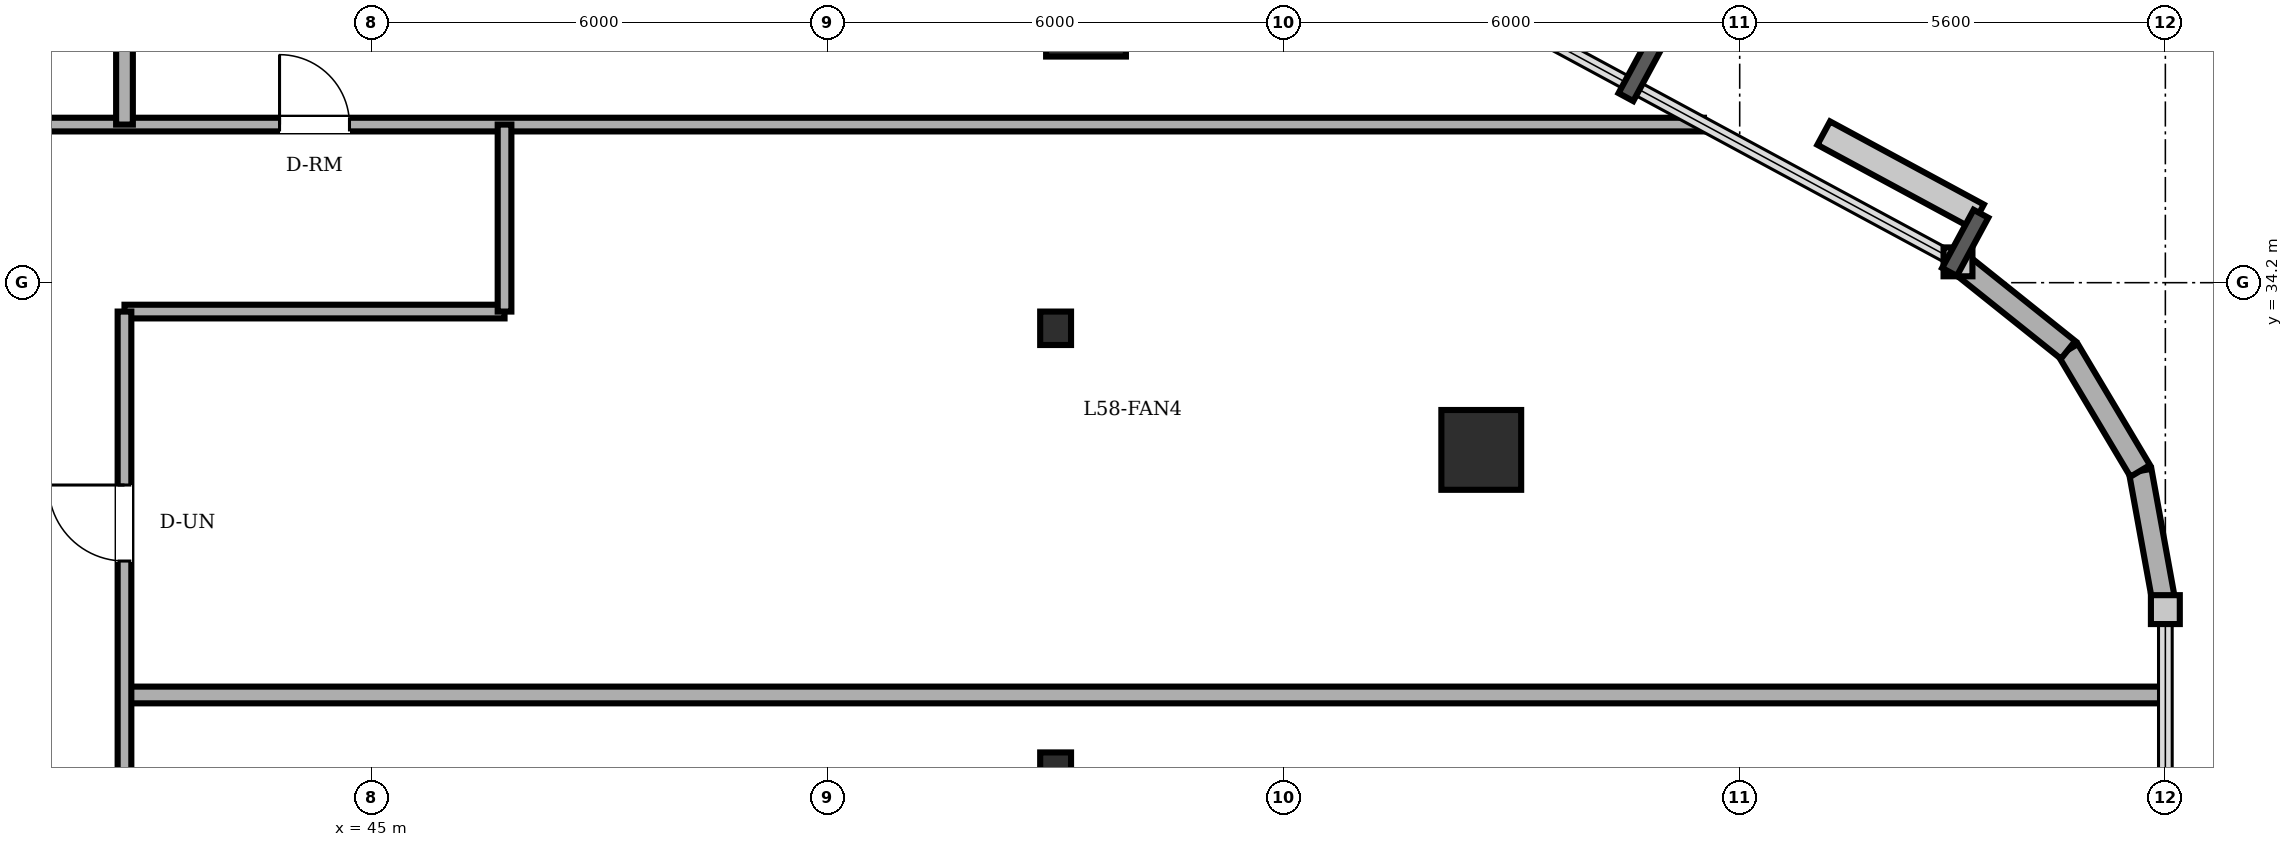
"""IFC4 building model, lengths in metres.
Left out: names, types, materials, properties, quantities, classifications, styles, units other than length and angle.
Written with IfcOpenShell. Run it as: python <this file> out.ifc"""

import sys

from ifc_helpers import new_model, si_unit, direction, frame, frame_2d, origin, origin_2d, place, context, subcontext, project, spatial, rectangle, circle, i_section, extrude, element, fill, save


model = new_model("IFC4")
c1 = context("Model", 3, precision=1e-05, world=origin(), true_north=direction((0.0, 1.0)))
c2 = subcontext(c1, "Body", "Model", "MODEL_VIEW")
j1 = project(units=[si_unit("LENGTHUNIT", "METRE"), si_unit("PLANEANGLEUNIT", "RADIAN")], contexts=[c1])
p1 = place(None, origin())
s1 = spatial("IfcSite", under=j1, at=p1, CompositionType="ELEMENT")
p2 = place(p1, origin())
s2 = spatial("IfcBuilding", under=s1, at=p2, CompositionType="ELEMENT")
p3 = place(p2, frame((0.0, 0.0, 222.9)))
s3 = spatial("IfcBuildingStorey", under=s2, at=p3, CompositionType="ELEMENT", Elevation=222.9)
for number, where, z_axis, x_axis in (
    (1, (59.6, 32.0, 0.0), (0.0, 0.0, 1.0), (1.0, 0.0, 0.0)),
    (2, (54.4, 37.7, 0.0), (0.0, 0.0, 1.0), (1.0, 0.0, 0.0)),
):
    element("IfcColumn", number, at=place(p3, frame(where, z_axis=z_axis, x_axis=x_axis)), inside=s3, PredefinedType="COLUMN", context=c2, shape_type="SweptSolid", body=[
        extrude(circle(Radius=0.525, at=origin_2d()), origin(), (0.0, 0.0, 1.0), 3.6),
    ])
for number, where, z_axis, x_axis in (
    (3, (54.0, 27.8, 0.0), (0.0, 0.0, 1.0), (1.0, 0.0, 0.0)),
    (4, (54.0, 33.6, 0.0), (0.0, 0.0, 1.0), (1.0, 0.0, 0.0)),
):
    element("IfcColumn", number, at=place(p3, frame(where, z_axis=z_axis, x_axis=x_axis)), inside=s3, PredefinedType="COLUMN", context=c2, shape_type="SweptSolid", body=[
        extrude(i_section(OverallWidth=0.406, OverallDepth=0.44, WebThickness=0.024, FlangeThickness=0.039, FilletRadius=0.015, at=origin_2d()), origin(), (0.0, 0.0, 1.0), 3.6),
    ])
p4 = place(p3, frame((68.6, 29.899, 0.0), z_axis=(0.0, 0.0, 1.0), x_axis=(-0.178468469252, 0.983945631365, 0.0)))
e5 = element("IfcWall", 5, at=p4, inside=s3, PredefinedType="SOLIDWALL", context=c2, shape_type="SweptSolid", body=[
    extrude(rectangle(XDim=1.855, YDim=0.3, at=frame_2d((0.927, 0.0))), origin(), (0.0, 0.0, 1.0), 3.4),
])
p5 = place(p3, frame((68.269, 31.724, 0.0), z_axis=(0.0, 0.0, 1.0), x_axis=(-0.512072018927, 0.858942516955, 0.0)))
e6 = element("IfcWall", 6, at=p5, inside=s3, PredefinedType="SOLIDWALL", context=c2, shape_type="SweptSolid", body=[
    extrude(rectangle(XDim=1.853, YDim=0.3, at=frame_2d((0.927, 0.0))), origin(), (0.0, 0.0, 1.0), 3.4),
])
p6 = place(p3, frame((67.32, 33.316, 0.0), z_axis=(0.0, 0.0, 1.0), x_axis=(-0.780920189257, 0.624630817372, 0.0)))
e7 = element("IfcWall", 7, at=p6, inside=s3, PredefinedType="SOLIDWALL", context=c2, shape_type="SweptSolid", body=[
    extrude(rectangle(XDim=1.854, YDim=0.3, at=frame_2d((0.927, 0.0))), origin(), (0.0, 0.0, 1.0), 3.4),
])
p7 = place(p3, frame((41.75, 28.776, 0.0), z_axis=(0.0, 0.0, 1.0), x_axis=(1.0, 0.0, 0.0)))
e8 = element("IfcWall", 8, at=p7, inside=s3, PredefinedType="PARTITIONING", context=c2, shape_type="SweptSolid", body=[
    extrude(rectangle(XDim=26.85, YDim=0.22, at=frame_2d((13.425, 0.0))), origin(), (0.0, 0.0, 1.0), 3.4),
])
p8 = place(p3, frame((41.75, 33.82, 0.0), z_axis=(0.0, 0.0, 1.0), x_axis=(1.0, 0.0, 0.0)))
e9 = element("IfcWall", 9, at=p8, inside=s3, PredefinedType="PARTITIONING", context=c2, shape_type="SweptSolid", body=[
    extrude(rectangle(XDim=5.0, YDim=0.18, at=frame_2d((2.5, 0.0))), origin(), (0.0, 0.0, 1.0), 2.982),
])
p9 = place(p3, frame((17.677, 36.28, 0.0), z_axis=(0.0, 0.0, 1.0), x_axis=(1.0, 0.0, 0.0)))
e10 = element("IfcWall", 10, at=p9, inside=s3, PredefinedType="PARTITIONING", context=c2, shape_type="SweptSolid", body=[
    extrude(rectangle(XDim=44.853, YDim=0.18, at=frame_2d((22.427, 0.0))), origin(), (0.0, 0.0, 1.0), 3.4),
])
p10 = place(p9, frame((9.573, 0.0, 0.0)))
e11 = element("IfcOpeningElement", 11, at=p10, cuts=e10, PredefinedType="OPENING", context=c2, shape_type="SweptSolid", body=[
    extrude(rectangle(XDim=0.9, YDim=2.1, at=frame_2d((0.45, 1.05))), frame((0.0, 0.1, 0.0), z_axis=(0.0, -1.0, 0.0), x_axis=(1.0, 0.0, 0.0)), (0.0, 0.0, 1.0), 0.2),
])
p11 = place(p9, frame((13.193, 0.0, 0.0)))
e12 = element("IfcOpeningElement", 12, at=p11, cuts=e10, PredefinedType="OPENING", context=c2, shape_type="SweptSolid", body=[
    extrude(rectangle(XDim=0.86, YDim=2.1, at=frame_2d((0.43, 1.05))), frame((0.0, 0.1, 0.0), z_axis=(0.0, -1.0, 0.0), x_axis=(1.0, 0.0, 0.0)), (0.0, 0.0, 1.0), 0.2),
])
p12 = place(p9, frame((26.113, 0.0, 0.0)))
e13 = element("IfcOpeningElement", 13, at=p12, cuts=e10, PredefinedType="OPENING", context=c2, shape_type="SweptSolid", body=[
    extrude(rectangle(XDim=0.92, YDim=2.1, at=frame_2d((0.46, 1.05))), frame((0.0, 0.1, 0.0), z_axis=(0.0, -1.0, 0.0), x_axis=(1.0, 0.0, 0.0)), (0.0, 0.0, 1.0), 0.2),
])
p13 = place(p9, frame((4.063, 0.0, 0.0)))
e14 = element("IfcOpeningElement", 14, at=p13, cuts=e10, PredefinedType="OPENING", context=c2, shape_type="SweptSolid", body=[
    extrude(rectangle(XDim=0.92, YDim=2.1, at=frame_2d((0.46, 1.05))), frame((0.0, 0.1, 0.0), z_axis=(0.0, -1.0, 0.0), x_axis=(1.0, 0.0, 0.0)), (0.0, 0.0, 1.0), 0.2),
])
p14 = place(p9, frame((19.338, 0.0, 0.0)))
e15 = element("IfcOpeningElement", 15, at=p14, cuts=e10, PredefinedType="OPENING", context=c2, shape_type="SweptSolid", body=[
    extrude(rectangle(XDim=0.92, YDim=2.1, at=frame_2d((0.46, 1.05))), frame((0.0, 0.1, 0.0), z_axis=(0.0, -1.0, 0.0), x_axis=(1.0, 0.0, 0.0)), (0.0, 0.0, 1.0), 0.2),
])
p15 = place(p3, frame((41.75, 14.18, 0.0), z_axis=(0.0, 0.0, 1.0), x_axis=(0.0, 1.0, 0.0)))
e16 = element("IfcWall", 16, at=p15, inside=s3, PredefinedType="PARTITIONING", context=c2, shape_type="SweptSolid", body=[
    extrude(rectangle(XDim=19.64, YDim=0.18, at=frame_2d((9.82, 0.0))), origin(), (0.0, 0.0, 1.0), 3.4),
])
p16 = place(p15, frame((2.322, 0.0, 0.0)))
e17 = element("IfcOpeningElement", 17, at=p16, cuts=e16, PredefinedType="OPENING", context=c2, shape_type="SweptSolid", body=[
    extrude(rectangle(XDim=0.92, YDim=2.1, at=frame_2d((0.46, 1.05))), frame((0.0, 0.1, 0.0), z_axis=(0.0, -1.0, 0.0), x_axis=(1.0, 0.0, 0.0)), (0.0, 0.0, 1.0), 0.2),
])
p17 = place(p15, frame((6.517, 0.0, 0.0)))
e18 = element("IfcOpeningElement", 18, at=p17, cuts=e16, PredefinedType="OPENING", context=c2, shape_type="SweptSolid", body=[
    extrude(rectangle(XDim=0.92, YDim=2.1, at=frame_2d((0.46, 1.05))), frame((0.0, 0.1, 0.0), z_axis=(0.0, -1.0, 0.0), x_axis=(1.0, 0.0, 0.0)), (0.0, 0.0, 1.0), 0.2),
])
p18 = place(p15, frame((11.293, 0.0, 0.0)))
e19 = element("IfcOpeningElement", 19, at=p18, cuts=e16, PredefinedType="OPENING", context=c2, shape_type="SweptSolid", body=[
    extrude(rectangle(XDim=0.92, YDim=2.1, at=frame_2d((0.46, 1.05))), frame((0.0, 0.1, 0.0), z_axis=(0.0, -1.0, 0.0), x_axis=(1.0, 0.0, 0.0)), (0.0, 0.0, 1.0), 0.2),
])
p19 = place(p15, frame((16.358, 0.0, 0.0)))
e20 = element("IfcOpeningElement", 20, at=p19, cuts=e16, PredefinedType="OPENING", context=c2, shape_type="SweptSolid", body=[
    extrude(rectangle(XDim=1.0, YDim=2.15, at=frame_2d((0.5, 1.075))), frame((0.0, 0.1, 0.0), z_axis=(0.0, -1.0, 0.0), x_axis=(1.0, 0.0, 0.0)), (0.0, 0.0, 1.0), 0.2),
])
p20 = place(p3, frame((41.75, 36.28, 0.0), z_axis=(0.0, 0.0, 1.0), x_axis=(0.0, 1.0, 0.0)))
e21 = element("IfcWall", 21, at=p20, inside=s3, PredefinedType="PARTITIONING", context=c2, shape_type="SweptSolid", body=[
    extrude(rectangle(XDim=3.42, YDim=0.22, at=frame_2d((1.71, 0.0))), origin(), (0.0, 0.0, 1.0), 3.4),
])
p21 = place(p3, frame((46.75, 33.82, 0.0), z_axis=(0.0, 0.0, 1.0), x_axis=(0.0, 1.0, 0.0)))
e22 = element("IfcWall", 22, at=p21, inside=s3, PredefinedType="PARTITIONING", context=c2, shape_type="SweptSolid", body=[
    extrude(rectangle(XDim=2.46, YDim=0.18, at=frame_2d((1.23, 0.0))), origin(), (0.0, 0.0, 1.0), 3.4),
])
p22 = place(p19, origin())
e23 = element("IfcDoor", 23, at=p22, inside=s3, OperationType="SINGLE_SWING_RIGHT", PredefinedType="DOOR", context=c2, shape_type="SweptSolid", body=[
    extrude(rectangle(XDim=1.0, YDim=2.15, at=frame_2d((0.5, 1.075))), frame((0.0, 0.025, 0.0), z_axis=(0.0, -1.0, 0.0), x_axis=(1.0, 0.0, 0.0)), (0.0, 0.0, 1.0), 0.05),
])
fill(e20, e23)
p23 = place(p12, origin())
e24 = element("IfcDoor", 24, at=p23, inside=s3, OperationType="SINGLE_SWING_LEFT", PredefinedType="DOOR", context=c2, shape_type="SweptSolid", body=[
    extrude(rectangle(XDim=0.92, YDim=2.1, at=frame_2d((0.46, 1.05))), frame((0.0, 0.025, 0.0), z_axis=(0.0, -1.0, 0.0), x_axis=(1.0, 0.0, 0.0)), (0.0, 0.0, 1.0), 0.05),
])
fill(e13, e24)
save(model, sys.argv[1])
